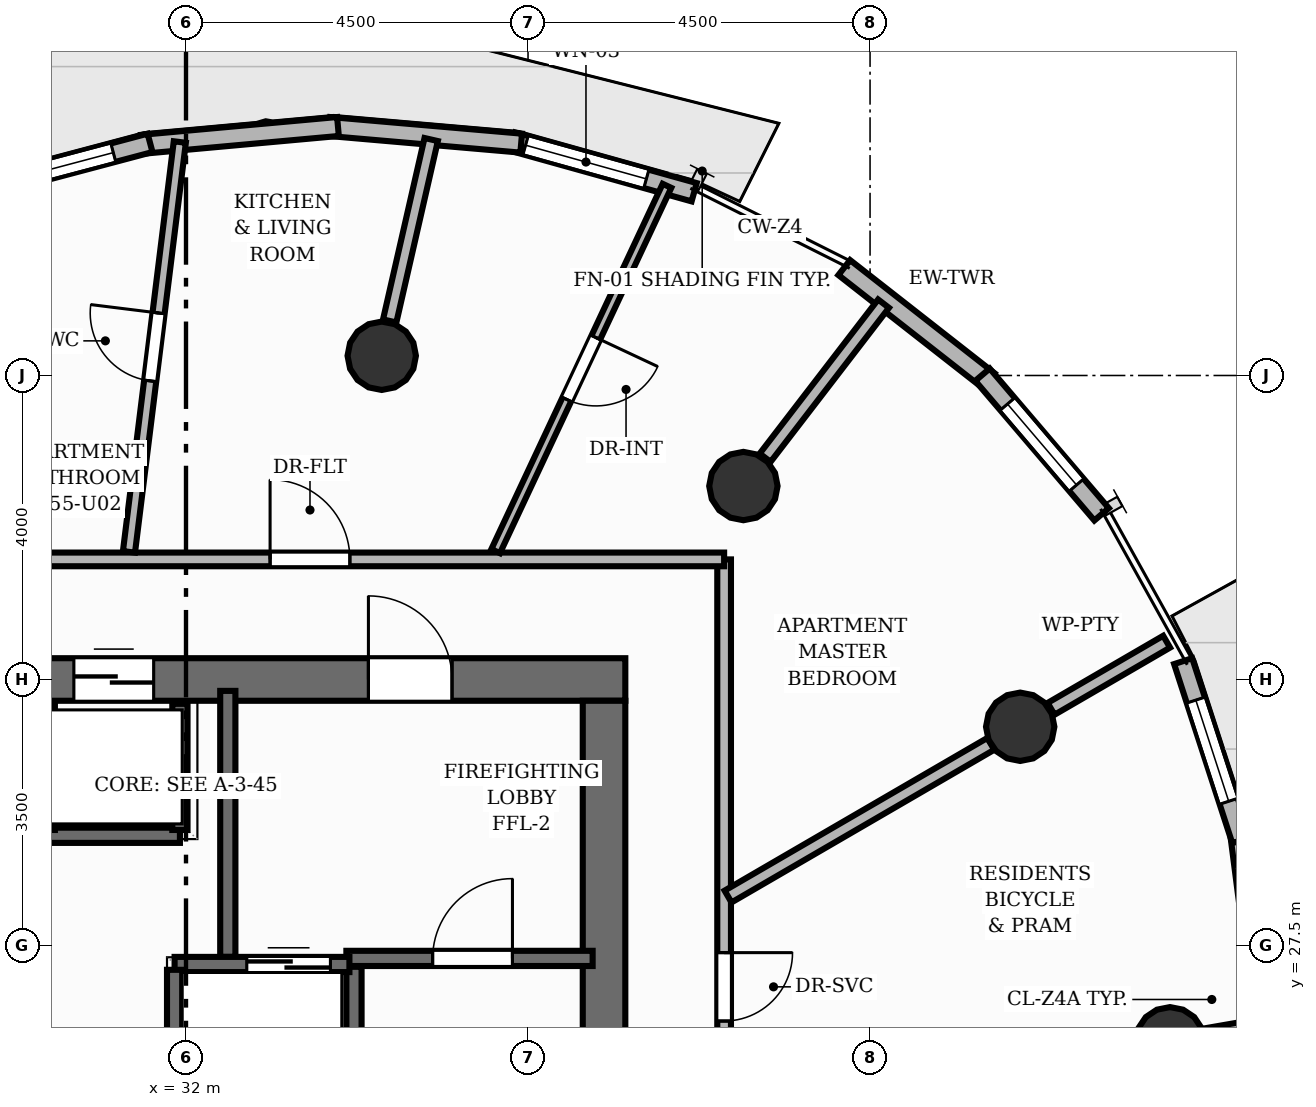
"""IFC4 building model, lengths in metres.
Left out: names, types, materials, properties, quantities, classifications, styles, units other than length and angle.
Written with IfcOpenShell. Run it as: python <this file> out.ifc"""

import sys

from ifc_helpers import new_model, si_unit, direction, frame, frame_2d, origin, origin_2d, place, context, subcontext, project, spatial, rectangle, circle, extrude, element, fill, save


model = new_model("IFC4")
c1 = context("Model", 3, precision=1e-05, world=origin(), true_north=direction((0.0, 1.0)))
c2 = subcontext(c1, "Body", "Model", "MODEL_VIEW")
j1 = project(units=[si_unit("LENGTHUNIT", "METRE"), si_unit("PLANEANGLEUNIT", "RADIAN")], contexts=[c1])
p1 = place(None, origin())
s1 = spatial("IfcSite", under=j1, at=p1, CompositionType="ELEMENT")
p2 = place(p1, origin())
s2 = spatial("IfcBuilding", under=s1, at=p2, CompositionType="ELEMENT")
p3 = place(p2, frame((0.0, 0.0, 185.44)))
s3 = spatial("IfcBuildingStorey", under=s2, at=p3, CompositionType="ELEMENT", Elevation=185.44)
p4 = place(p3, frame((26.22, 31.0, 0.0), z_axis=(0.0, 0.0, 1.0), x_axis=(1.0, 0.0, 0.0)))
e1 = element("IfcWall", 1, at=p4, inside=s3, PredefinedType="SHEAR", context=c2, shape_type="SweptSolid", body=[
    extrude(rectangle(XDim=11.56, YDim=0.56, at=frame_2d((5.78, 0.0))), origin(), (0.0, 0.0, 1.0), 3.2),
])
p5 = place(p4, frame((8.18, 0.0, 0.0)))
e2 = element("IfcOpeningElement", 2, at=p5, cuts=e1, PredefinedType="OPENING", context=c2, shape_type="SweptSolid", body=[
    extrude(rectangle(XDim=1.1, YDim=2.15, at=frame_2d((0.55, 1.075))), frame((0.0, 0.29, 0.0), z_axis=(0.0, -1.0, 0.0), x_axis=(1.0, 0.0, 0.0)), (0.0, 0.0, 1.0), 0.58),
])
p6 = place(p4, frame((0.805, 0.0, 0.0)))
e3 = element("IfcOpeningElement", 3, at=p6, cuts=e1, PredefinedType="OPENING", context=c2, shape_type="SweptSolid", body=[
    extrude(rectangle(XDim=1.05, YDim=2.15, at=frame_2d((0.525, 1.075))), frame((0.0, 0.29, 0.0), z_axis=(0.0, -1.0, 0.0), x_axis=(1.0, 0.0, 0.0)), (0.0, 0.0, 1.0), 0.58),
])
p7 = place(p4, frame((2.555, 0.0, 0.0)))
e4 = element("IfcOpeningElement", 4, at=p7, cuts=e1, PredefinedType="OPENING", context=c2, shape_type="SweptSolid", body=[
    extrude(rectangle(XDim=1.05, YDim=2.15, at=frame_2d((0.525, 1.075))), frame((0.0, 0.29, 0.0), z_axis=(0.0, -1.0, 0.0), x_axis=(1.0, 0.0, 0.0)), (0.0, 0.0, 1.0), 0.58),
])
p8 = place(p4, frame((4.305, 0.0, 0.0)))
e5 = element("IfcOpeningElement", 5, at=p8, cuts=e1, PredefinedType="OPENING", context=c2, shape_type="SweptSolid", body=[
    extrude(rectangle(XDim=1.05, YDim=2.15, at=frame_2d((0.525, 1.075))), frame((0.0, 0.29, 0.0), z_axis=(0.0, -1.0, 0.0), x_axis=(1.0, 0.0, 0.0)), (0.0, 0.0, 1.0), 0.58),
])
p9 = place(p3, frame((37.5, 17.28, 0.0), z_axis=(0.0, 0.0, 1.0), x_axis=(0.0, 1.0, 0.0)))
e6 = element("IfcWall", 6, at=p9, inside=s3, PredefinedType="SHEAR", context=c2, shape_type="SweptSolid", body=[
    extrude(rectangle(XDim=13.44, YDim=0.56, at=frame_2d((6.72, 0.0))), origin(), (0.0, 0.0, 1.0), 3.2),
])
for number, where, z_axis, x_axis in (
    (7, (44.946, 26.24, 0.0), (0.0, 0.0, 1.0), (1.0, 0.0, 0.0)),
    (8, (42.975, 30.378, 0.0), (0.0, 0.0, 1.0), (1.0, 0.0, 0.0)),
    (9, (39.333, 33.545, 0.0), (0.0, 0.0, 1.0), (1.0, 0.0, 0.0)),
    (10, (34.575, 35.26, 0.0), (0.0, 0.0, 1.0), (1.0, 0.0, 0.0)),
):
    element("IfcColumn", number, at=place(p3, frame(where, z_axis=z_axis, x_axis=x_axis)), inside=s3, PredefinedType="COLUMN", context=c2, shape_type="SweptSolid", body=[
        extrude(circle(Radius=0.45, at=origin_2d()), origin(), (0.0, 0.0, 1.0), 3.2),
    ])
p10 = place(p3, frame((40.661, 36.42, 0.0), z_axis=(0.0, 0.0, 1.0), x_axis=(0.787404715416, -0.616436382883, 0.0)))
e11 = element("IfcWall", 11, at=p10, inside=s3, PredefinedType="SOLIDWALL", context=c2, shape_type="SweptSolid", body=[
    extrude(rectangle(XDim=2.415, YDim=0.25, at=frame_2d((1.208, 0.0))), origin(), (0.0, 0.0, 1.0), 2.96),
])
p11 = place(p3, frame((36.299, 38.077, 0.0), z_axis=(0.0, 0.0, 1.0), x_axis=(0.96316841201, -0.26889888454, 0.0)))
e12 = element("IfcWall", 12, at=p11, inside=s3, PredefinedType="SOLIDWALL", context=c2, shape_type="SweptSolid", body=[
    extrude(rectangle(XDim=2.478, YDim=0.25, at=frame_2d((1.239, 0.0))), origin(), (0.0, 0.0, 1.0), 2.96),
])
p12 = place(p11, frame((0.175, 0.0, 0.85)))
e13 = element("IfcOpeningElement", 13, at=p12, cuts=e12, PredefinedType="OPENING", context=c2, shape_type="SweptSolid", body=[
    extrude(rectangle(XDim=1.65, YDim=1.55, at=frame_2d((0.825, 0.775))), frame((0.0, 0.135, 0.0), z_axis=(0.0, -1.0, 0.0), x_axis=(1.0, 0.0, 0.0)), (0.0, 0.0, 1.0), 0.27),
])
p13 = place(p3, frame((33.888, 38.276, 0.0), z_axis=(0.0, 0.0, 1.0), x_axis=(0.996260822813, -0.08639660252, 0.0)))
e14 = element("IfcWall", 14, at=p13, inside=s3, PredefinedType="SOLIDWALL", context=c2, shape_type="SweptSolid", body=[
    extrude(rectangle(XDim=2.532, YDim=0.25, at=frame_2d((1.266, 0.0))), origin(), (0.0, 0.0, 1.0), 2.96),
])
p14 = place(p3, frame((31.418, 38.042, 0.0), z_axis=(0.0, 0.0, 1.0), x_axis=(0.995895522128, 0.090510270169, 0.0)))
e15 = element("IfcWall", 15, at=p14, inside=s3, PredefinedType="SOLIDWALL", context=c2, shape_type="SweptSolid", body=[
    extrude(rectangle(XDim=2.592, YDim=0.25, at=frame_2d((1.296, 0.0))), origin(), (0.0, 0.0, 1.0), 2.96),
])
p15 = place(p3, frame((28.965, 37.381, 0.0), z_axis=(0.0, 0.0, 1.0), x_axis=(0.96652474621, 0.256573410476, 0.0)))
e16 = element("IfcWall", 16, at=p15, inside=s3, PredefinedType="SOLIDWALL", context=c2, shape_type="SweptSolid", body=[
    extrude(rectangle(XDim=2.651, YDim=0.25, at=frame_2d((1.325, 0.0))), origin(), (0.0, 0.0, 1.0), 2.96),
])
p16 = place(p15, frame((0.501, 0.0, 0.85)))
e17 = element("IfcOpeningElement", 17, at=p16, cuts=e16, PredefinedType="OPENING", context=c2, shape_type="SweptSolid", body=[
    extrude(rectangle(XDim=1.65, YDim=1.55, at=frame_2d((0.825, 0.775))), frame((0.0, 0.135, 0.0), z_axis=(0.0, -1.0, 0.0), x_axis=(1.0, 0.0, 0.0)), (0.0, 0.0, 1.0), 0.27),
])
p17 = place(p3, frame((45.86, 28.995, 0.0), z_axis=(0.0, 0.0, 1.0), x_axis=(0.128057007482, -0.991766808698, 0.0)))
e18 = element("IfcWall", 18, at=p17, inside=s3, PredefinedType="SOLIDWALL", context=c2, shape_type="SweptSolid", body=[
    extrude(rectangle(XDim=2.532, YDim=0.25, at=frame_2d((1.266, 0.0))), origin(), (0.0, 0.0, 1.0), 2.96),
])
p18 = place(p17, frame((0.441, 0.0, 0.85)))
e19 = element("IfcOpeningElement", 19, at=p18, cuts=e18, PredefinedType="OPENING", context=c2, shape_type="SweptSolid", body=[
    extrude(rectangle(XDim=1.65, YDim=1.55, at=frame_2d((0.825, 0.775))), frame((0.0, 0.135, 0.0), z_axis=(0.0, -1.0, 0.0), x_axis=(1.0, 0.0, 0.0)), (0.0, 0.0, 1.0), 0.27),
])
p19 = place(p3, frame((45.119, 31.241, 0.0), z_axis=(0.0, 0.0, 1.0), x_axis=(0.309005861828, -0.951060133407, 0.0)))
e20 = element("IfcWall", 20, at=p19, inside=s3, PredefinedType="SOLIDWALL", context=c2, shape_type="SweptSolid", body=[
    extrude(rectangle(XDim=2.478, YDim=0.25, at=frame_2d((1.239, 0.0))), origin(), (0.0, 0.0, 1.0), 2.96),
])
p20 = place(p19, frame((0.539, 0.0, 0.85)))
e21 = element("IfcOpeningElement", 21, at=p20, cuts=e20, PredefinedType="OPENING", context=c2, shape_type="SweptSolid", body=[
    extrude(rectangle(XDim=1.4, YDim=1.55, at=frame_2d((0.7, 0.775))), frame((0.0, 0.135, 0.0), z_axis=(0.0, -1.0, 0.0), x_axis=(1.0, 0.0, 0.0)), (0.0, 0.0, 1.0), 0.27),
])
p21 = place(p3, frame((42.479, 35.01, 0.0), z_axis=(0.0, 0.0, 1.0), x_axis=(0.648874307696, -0.760895612297, 0.0)))
e22 = element("IfcWall", 22, at=p21, inside=s3, PredefinedType="SOLIDWALL", context=c2, shape_type="SweptSolid", body=[
    extrude(rectangle(XDim=2.415, YDim=0.25, at=frame_2d((1.208, 0.0))), origin(), (0.0, 0.0, 1.0), 2.96),
])
p22 = place(p21, frame((0.507, 0.0, 0.85)))
e23 = element("IfcOpeningElement", 23, at=p22, cuts=e22, PredefinedType="OPENING", context=c2, shape_type="SweptSolid", body=[
    extrude(rectangle(XDim=1.4, YDim=1.55, at=frame_2d((0.7, 0.775))), frame((0.0, 0.135, 0.0), z_axis=(0.0, -1.0, 0.0), x_axis=(1.0, 0.0, 0.0)), (0.0, 0.0, 1.0), 0.27),
])
p23 = place(p3, frame((34.21, 20.78, 0.0), z_axis=(0.0, 0.0, 1.0), x_axis=(0.0, 1.0, 0.0)))
e24 = element("IfcWall", 24, at=p23, inside=s3, PredefinedType="SHEAR", context=c2, shape_type="SweptSolid", body=[
    extrude(rectangle(XDim=6.44, YDim=0.2, at=frame_2d((3.22, 0.0))), origin(), (0.0, 0.0, 1.0), 3.2),
])
p24 = place(p3, frame((34.11, 27.33, 0.0), z_axis=(0.0, 0.0, 1.0), x_axis=(1.0, 0.0, 0.0)))
e25 = element("IfcWall", 25, at=p24, inside=s3, PredefinedType="SHEAR", context=c2, shape_type="SweptSolid", body=[
    extrude(rectangle(XDim=3.24, YDim=0.2, at=frame_2d((1.62, 0.0))), origin(), (0.0, 0.0, 1.0), 3.2),
])
p25 = place(p24, frame((1.135, 0.0, 0.0)))
e26 = element("IfcOpeningElement", 26, at=p25, cuts=e25, PredefinedType="OPENING", context=c2, shape_type="SweptSolid", body=[
    extrude(rectangle(XDim=1.05, YDim=2.15, at=frame_2d((0.525, 1.075))), frame((0.0, 0.11, 0.0), z_axis=(0.0, -1.0, 0.0), x_axis=(1.0, 0.0, 0.0)), (0.0, 0.0, 1.0), 0.22),
])
p26 = place(p3, frame((32.55, 27.35, 0.0), z_axis=(0.0, 0.0, 1.0), x_axis=(0.0, 1.0, 0.0)))
e27 = element("IfcWall", 27, at=p26, inside=s3, PredefinedType="SHEAR", context=c2, shape_type="SweptSolid", body=[
    extrude(rectangle(XDim=3.5, YDim=0.2, at=frame_2d((1.75, 0.0))), origin(), (0.0, 0.0, 1.0), 3.2),
])
p27 = place(p3, frame((31.85, 27.25, 0.0), z_axis=(0.0, 0.0, 1.0), x_axis=(1.0, 0.0, 0.0)))
e28 = element("IfcWall", 28, at=p27, inside=s3, PredefinedType="SHEAR", context=c2, shape_type="SweptSolid", body=[
    extrude(rectangle(XDim=2.3, YDim=0.2, at=frame_2d((1.15, 0.0))), origin(), (0.0, 0.0, 1.0), 3.2),
])
p28 = place(p27, frame((0.95, 0.0, 0.0)))
e29 = element("IfcOpeningElement", 29, at=p28, cuts=e28, PredefinedType="OPENING", context=c2, shape_type="SweptSolid", body=[
    extrude(rectangle(XDim=1.1, YDim=2.15, at=frame_2d((0.55, 1.075))), frame((0.0, 0.11, 0.0), z_axis=(0.0, -1.0, 0.0), x_axis=(1.0, 0.0, 0.0)), (0.0, 0.0, 1.0), 0.22),
])
p29 = place(p3, frame((31.85, 25.47, 0.0), z_axis=(0.0, 0.0, 1.0), x_axis=(0.0, 1.0, 0.0)))
e30 = element("IfcWall", 30, at=p29, inside=s3, PredefinedType="SHEAR", context=c2, shape_type="SweptSolid", body=[
    extrude(rectangle(XDim=1.71, YDim=0.2, at=frame_2d((0.855, 0.0))), origin(), (0.0, 0.0, 1.0), 3.2),
])
p30 = place(p3, frame((26.68, 28.95, 0.0), z_axis=(0.0, 0.0, 1.0), x_axis=(1.0, 0.0, 0.0)))
e31 = element("IfcWall", 31, at=p30, inside=s3, PredefinedType="SHEAR", context=c2, shape_type="SweptSolid", body=[
    extrude(rectangle(XDim=5.24, YDim=0.2, at=frame_2d((2.62, 0.0))), origin(), (0.0, 0.0, 1.0), 3.2),
])
for number, where, z_axis, x_axis in (
    (32, (31.92, 29.02, 0.0), (0.0, 0.0, 1.0), (0.0, 1.0, 0.0)),
    (33, (30.175, 29.02, 0.0), (0.0, 0.0, 1.0), (0.0, 1.0, 0.0)),
):
    element("IfcWall", number, at=place(p3, frame(where, z_axis=z_axis, x_axis=x_axis)), inside=s3, PredefinedType="SHEAR", context=c2, shape_type="SweptSolid", body=[
        extrude(rectangle(XDim=1.66, YDim=0.2, at=frame_2d((0.83, 0.0))), origin(), (0.0, 0.0, 1.0), 3.2),
    ])
p31 = place(p3, frame((45.409, 26.32, 0.0), z_axis=(0.0, 0.0, 1.0), x_axis=(0.985336223431, 0.170623933826, 0.0)))
e34 = element("IfcWall", 34, at=p31, inside=s3, PredefinedType="PARTITIONING", context=c2, shape_type="SweptSolid", body=[
    extrude(rectangle(XDim=0.718, YDim=0.18, at=frame_2d((0.359, 0.0))), origin(), (0.0, 0.0, 1.0), 2.404),
])
p32 = place(p3, frame((43.382, 30.614, 0.0), z_axis=(0.0, 0.0, 1.0), x_axis=(0.86461381872, 0.502437005482, 0.0)))
e35 = element("IfcWall", 35, at=p32, inside=s3, PredefinedType="PARTITIONING", context=c2, shape_type="SweptSolid", body=[
    extrude(rectangle(XDim=1.758, YDim=0.18, at=frame_2d((0.879, 0.0))), origin(), (0.0, 0.0, 1.0), 2.404),
])
p33 = place(p3, frame((39.62, 33.918, 0.0), z_axis=(0.0, 0.0, 1.0), x_axis=(0.609249164273, 0.792978849549, 0.0)))
e36 = element("IfcWall", 36, at=p33, inside=s3, PredefinedType="PARTITIONING", context=c2, shape_type="SweptSolid", body=[
    extrude(rectangle(XDim=2.557, YDim=0.18, at=frame_2d((1.278, 0.0))), origin(), (0.0, 0.0, 1.0), 2.404),
])
p34 = place(p3, frame((34.68, 35.718, 0.0), z_axis=(0.0, 0.0, 1.0), x_axis=(0.222943921747, 0.974831271429, 0.0)))
e37 = element("IfcWall", 37, at=p34, inside=s3, PredefinedType="PARTITIONING", context=c2, shape_type="SweptSolid", body=[
    extrude(rectangle(XDim=2.448, YDim=0.18, at=frame_2d((1.224, 0.0))), origin(), (0.0, 0.0, 1.0), 2.404),
])
p35 = place(p3, frame((39.08, 32.58, 0.0), z_axis=(0.0, 0.0, 1.0), x_axis=(0.0, -1.0, 0.0)))
e38 = element("IfcWall", 38, at=p35, inside=s3, PredefinedType="PARTITIONING", context=c2, shape_type="SweptSolid", body=[
    extrude(rectangle(XDim=8.094, YDim=0.18, at=frame_2d((4.047, 0.0))), origin(), (0.0, 0.0, 1.0), 2.955),
])
p36 = place(p35, frame((5.174, 0.0, 0.0)))
e39 = element("IfcOpeningElement", 39, at=p36, cuts=e38, PredefinedType="OPENING", context=c2, shape_type="SweptSolid", body=[
    extrude(rectangle(XDim=0.9, YDim=2.1, at=frame_2d((0.45, 1.05))), frame((0.0, 0.1, 0.0), z_axis=(0.0, -1.0, 0.0), x_axis=(1.0, 0.0, 0.0)), (0.0, 0.0, 1.0), 0.2),
])
p37 = place(p3, frame((24.92, 32.58, 0.0), z_axis=(0.0, 0.0, 1.0), x_axis=(1.0, 0.0, 0.0)))
e40 = element("IfcWall", 40, at=p37, inside=s3, PredefinedType="PARTITIONING", context=c2, shape_type="SweptSolid", body=[
    extrude(rectangle(XDim=14.16, YDim=0.18, at=frame_2d((7.08, 0.0))), origin(), (0.0, 0.0, 1.0), 2.955),
])
p38 = place(p37, frame((8.186, 0.0, 0.0)))
e41 = element("IfcOpeningElement", 41, at=p38, cuts=e40, PredefinedType="OPENING", context=c2, shape_type="SweptSolid", body=[
    extrude(rectangle(XDim=1.05, YDim=2.15, at=frame_2d((0.525, 1.075))), frame((0.0, 0.1, 0.0), z_axis=(0.0, -1.0, 0.0), x_axis=(1.0, 0.0, 0.0)), (0.0, 0.0, 1.0), 0.2),
])
p39 = place(p37, frame((2.119, 0.0, 0.0)))
e42 = element("IfcOpeningElement", 42, at=p39, cuts=e40, PredefinedType="OPENING", context=c2, shape_type="SweptSolid", body=[
    extrude(rectangle(XDim=0.9, YDim=2.1, at=frame_2d((0.45, 1.05))), frame((0.0, 0.1, 0.0), z_axis=(0.0, -1.0, 0.0), x_axis=(1.0, 0.0, 0.0)), (0.0, 0.0, 1.0), 0.2),
])
p40 = place(p3, frame((39.132, 28.144, 0.0), z_axis=(0.0, 0.0, 1.0), x_axis=(0.864597268714, 0.502465484319, 0.0)))
e43 = element("IfcWall", 43, at=p40, inside=s3, PredefinedType="PARTITIONING", context=c2, shape_type="SweptSolid", body=[
    extrude(rectangle(XDim=3.998, YDim=0.18, at=frame_2d((1.999, 0.0))), origin(), (0.0, 0.0, 1.0), 2.404),
])
p41 = place(p3, frame((31.25, 32.679, 0.0), z_axis=(0.0, 0.0, 1.0), x_axis=(0.123100196343, 0.992394247091, 0.0)))
e44 = element("IfcWall", 44, at=p41, inside=s3, PredefinedType="PLUMBINGWALL", context=c2, shape_type="SweptSolid", body=[
    extrude(rectangle(XDim=5.434, YDim=0.16, at=frame_2d((2.717, 0.0))), origin(), (0.0, 0.0, 1.0), 2.692),
])
p42 = place(p41, frame((2.267, 0.0, 0.0)))
e45 = element("IfcOpeningElement", 45, at=p42, cuts=e44, PredefinedType="OPENING", context=c2, shape_type="SweptSolid", body=[
    extrude(rectangle(XDim=0.9, YDim=2.1, at=frame_2d((0.45, 1.05))), frame((0.0, 0.09, 0.0), z_axis=(0.0, -1.0, 0.0), x_axis=(1.0, 0.0, 0.0)), (0.0, 0.0, 1.0), 0.18),
])
p43 = place(p3, frame((38.328, 37.496, 0.0), z_axis=(0.0, 0.0, 1.0), x_axis=(-0.424538730781, -0.905409777983, 0.0)))
e46 = element("IfcWall", 46, at=p43, inside=s3, PredefinedType="PARTITIONING", context=c2, shape_type="SweptSolid", body=[
    extrude(rectangle(XDim=5.309, YDim=0.125, at=frame_2d((2.655, 0.0))), origin(), (0.0, 0.0, 1.0), 2.955),
])
p44 = place(p43, frame((2.205, 0.0, 0.0)))
e47 = element("IfcOpeningElement", 47, at=p44, cuts=e46, PredefinedType="OPENING", context=c2, shape_type="SweptSolid", body=[
    extrude(rectangle(XDim=0.9, YDim=2.1, at=frame_2d((0.45, 1.05))), frame((0.0, 0.073, 0.0), z_axis=(0.0, -1.0, 0.0), x_axis=(1.0, 0.0, 0.0)), (0.0, 0.0, 1.0), 0.145),
])
p45 = place(p12, origin())
e48 = element("IfcWindow", 48, at=p45, inside=s3, PartitioningType="SINGLE_PANEL", PredefinedType="WINDOW", context=c2, shape_type="SweptSolid", body=[
    extrude(rectangle(XDim=1.65, YDim=1.55, at=frame_2d((0.825, 0.775))), frame((0.0, 0.03, 0.0), z_axis=(0.0, -1.0, 0.0), x_axis=(1.0, 0.0, 0.0)), (0.0, 0.0, 1.0), 0.06),
])
fill(e13, e48)
p46 = place(p16, origin())
e49 = element("IfcWindow", 49, at=p46, inside=s3, PartitioningType="SINGLE_PANEL", PredefinedType="WINDOW", context=c2, shape_type="SweptSolid", body=[
    extrude(rectangle(XDim=1.65, YDim=1.55, at=frame_2d((0.825, 0.775))), frame((0.0, 0.03, 0.0), z_axis=(0.0, -1.0, 0.0), x_axis=(1.0, 0.0, 0.0)), (0.0, 0.0, 1.0), 0.06),
])
fill(e17, e49)
p47 = place(p20, origin())
e50 = element("IfcWindow", 50, at=p47, inside=s3, PartitioningType="SINGLE_PANEL", PredefinedType="WINDOW", context=c2, shape_type="SweptSolid", body=[
    extrude(rectangle(XDim=1.4, YDim=1.55, at=frame_2d((0.7, 0.775))), frame((0.0, 0.03, 0.0), z_axis=(0.0, -1.0, 0.0), x_axis=(1.0, 0.0, 0.0)), (0.0, 0.0, 1.0), 0.06),
])
fill(e21, e50)
p48 = place(p22, origin())
e51 = element("IfcWindow", 51, at=p48, inside=s3, PartitioningType="SINGLE_PANEL", PredefinedType="WINDOW", context=c2, shape_type="SweptSolid", body=[
    extrude(rectangle(XDim=1.4, YDim=1.55, at=frame_2d((0.7, 0.775))), frame((0.0, 0.03, 0.0), z_axis=(0.0, -1.0, 0.0), x_axis=(1.0, 0.0, 0.0)), (0.0, 0.0, 1.0), 0.06),
])
fill(e23, e51)
p49 = place(p25, origin())
e52 = element("IfcDoor", 52, at=p49, inside=s3, OperationType="SINGLE_SWING_RIGHT", PredefinedType="DOOR", context=c2, shape_type="SweptSolid", body=[
    extrude(rectangle(XDim=1.05, YDim=2.15, at=frame_2d((0.525, 1.075))), frame((0.0, 0.025, 0.0), z_axis=(0.0, -1.0, 0.0), x_axis=(1.0, 0.0, 0.0)), (0.0, 0.0, 1.0), 0.05),
])
fill(e26, e52)
p50 = place(p5, origin())
e53 = element("IfcDoor", 53, at=p50, inside=s3, OperationType="SINGLE_SWING_LEFT", PredefinedType="DOOR", context=c2, shape_type="SweptSolid", body=[
    extrude(rectangle(XDim=1.1, YDim=2.15, at=frame_2d((0.55, 1.075))), frame((0.0, 0.025, 0.0), z_axis=(0.0, -1.0, 0.0), x_axis=(1.0, 0.0, 0.0)), (0.0, 0.0, 1.0), 0.05),
])
fill(e2, e53)
p51 = place(p28, origin())
e54 = element("IfcDoor", 54, at=p51, inside=s3, OperationType="DOUBLE_DOOR_SLIDING", PredefinedType="DOOR", context=c2, shape_type="SweptSolid", body=[
    extrude(rectangle(XDim=1.1, YDim=2.15, at=frame_2d((0.55, 1.075))), frame((0.0, 0.025, 0.0), z_axis=(0.0, -1.0, 0.0), x_axis=(1.0, 0.0, 0.0)), (0.0, 0.0, 1.0), 0.05),
])
fill(e29, e54)
p52 = place(p8, origin())
e55 = element("IfcDoor", 55, at=p52, inside=s3, OperationType="DOUBLE_DOOR_SLIDING", PredefinedType="DOOR", context=c2, shape_type="SweptSolid", body=[
    extrude(rectangle(XDim=1.05, YDim=2.15, at=frame_2d((0.525, 1.075))), frame((0.0, 0.025, 0.0), z_axis=(0.0, -1.0, 0.0), x_axis=(1.0, 0.0, 0.0)), (0.0, 0.0, 1.0), 0.05),
])
fill(e5, e55)
p53 = place(p36, origin())
e56 = element("IfcDoor", 56, at=p53, inside=s3, OperationType="SINGLE_SWING_LEFT", PredefinedType="DOOR", context=c2, shape_type="SweptSolid", body=[
    extrude(rectangle(XDim=0.9, YDim=2.1, at=frame_2d((0.45, 1.05))), frame((0.0, 0.025, 0.0), z_axis=(0.0, -1.0, 0.0), x_axis=(1.0, 0.0, 0.0)), (0.0, 0.0, 1.0), 0.05),
])
fill(e39, e56)
p54 = place(p38, origin())
e57 = element("IfcDoor", 57, at=p54, inside=s3, OperationType="SINGLE_SWING_LEFT", PredefinedType="DOOR", context=c2, shape_type="SweptSolid", body=[
    extrude(rectangle(XDim=1.05, YDim=2.15, at=frame_2d((0.525, 1.075))), frame((0.0, 0.025, 0.0), z_axis=(0.0, -1.0, 0.0), x_axis=(1.0, 0.0, 0.0)), (0.0, 0.0, 1.0), 0.05),
])
fill(e41, e57)
p55 = place(p42, origin())
e58 = element("IfcDoor", 58, at=p55, inside=s3, OperationType="SINGLE_SWING_RIGHT", PredefinedType="DOOR", context=c2, shape_type="SweptSolid", body=[
    extrude(rectangle(XDim=0.9, YDim=2.1, at=frame_2d((0.45, 1.05))), frame((0.0, 0.025, 0.0), z_axis=(0.0, -1.0, 0.0), x_axis=(1.0, 0.0, 0.0)), (0.0, 0.0, 1.0), 0.05),
])
fill(e45, e58)
p56 = place(p44, origin())
e59 = element("IfcDoor", 59, at=p56, inside=s3, OperationType="SINGLE_SWING_LEFT", PredefinedType="DOOR", context=c2, shape_type="SweptSolid", body=[
    extrude(rectangle(XDim=0.9, YDim=2.1, at=frame_2d((0.45, 1.05))), frame((0.0, 0.025, 0.0), z_axis=(0.0, -1.0, 0.0), x_axis=(1.0, 0.0, 0.0)), (0.0, 0.0, 1.0), 0.05),
])
fill(e47, e59)
save(model, sys.argv[1])
